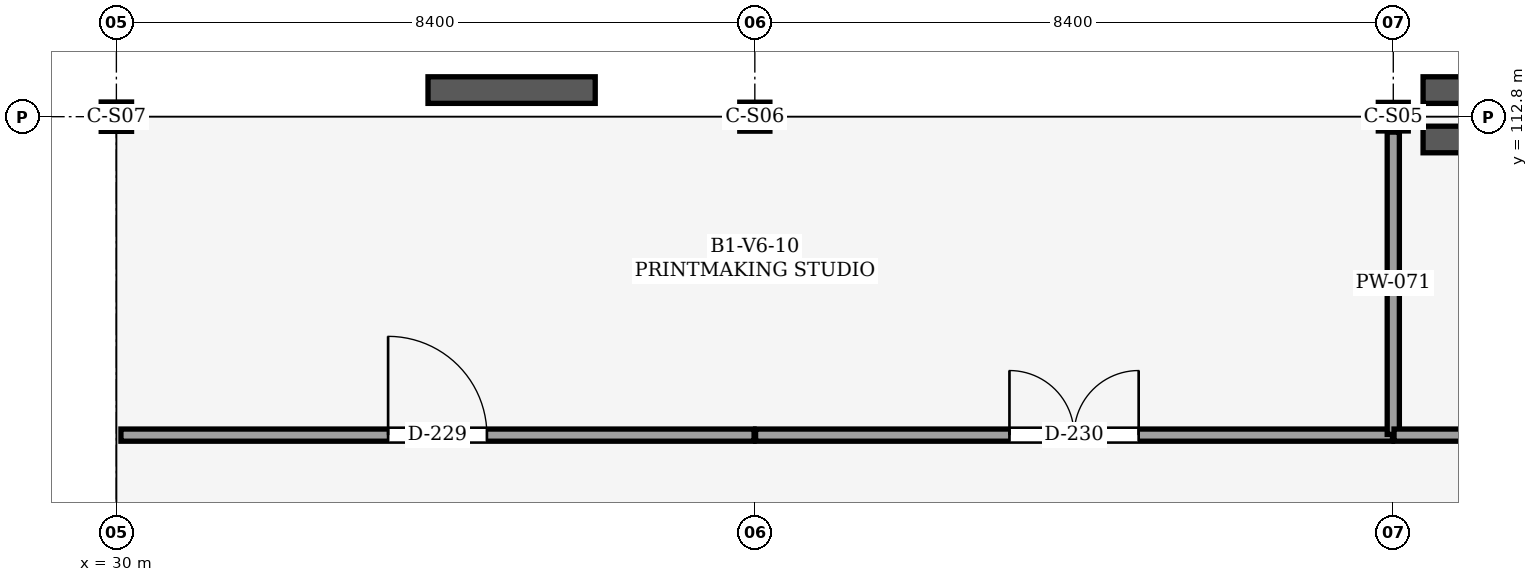
"""IFC4 building model, lengths in metres.
Left out: names, types, materials, properties, quantities, classifications, styles, units other than length and angle.
Written with IfcOpenShell. Run it as: python <this file> out.ifc"""

import sys

from ifc_helpers import new_model, si_unit, direction, frame, frame_2d, origin, origin_2d, place, context, subcontext, project, spatial, rectangle, i_section, extrude, element, fill, save


model = new_model("IFC4")
c1 = context("Model", 3, precision=1e-05, world=origin(), true_north=direction((0.0, 1.0)))
c2 = subcontext(c1, "Body", "Model", "MODEL_VIEW")
j1 = project(units=[si_unit("LENGTHUNIT", "METRE"), si_unit("PLANEANGLEUNIT", "RADIAN")], contexts=[c1])
p1 = place(None, origin())
s1 = spatial("IfcSite", under=j1, at=p1, CompositionType="ELEMENT")
p2 = place(p1, origin())
s2 = spatial("IfcBuilding", under=s1, at=p2, CompositionType="ELEMENT")
p3 = place(p2, frame((0.0, 0.0, -5.4)))
s3 = spatial("IfcBuildingStorey", under=s2, at=p3, CompositionType="ELEMENT", Elevation=-5.4)
p4 = place(p3, frame((30.0, 112.8, 0.0), z_axis=(0.0, 0.0, 1.0), x_axis=(1.0, 0.0, 0.0)))
e1 = element("IfcColumn", 1, at=p4, inside=s3, PredefinedType="COLUMN", context=c2, shape_type="SweptSolid", body=[
    extrude(i_section(OverallWidth=0.399, OverallDepth=0.386, WebThickness=0.021, FlangeThickness=0.033, FilletRadius=0.025, at=origin_2d()), origin(), (0.0, 0.0, 1.0), 5.4),
])
p5 = place(p3, frame((38.4, 112.8, 0.0), z_axis=(0.0, 0.0, 1.0), x_axis=(1.0, 0.0, 0.0)))
e2 = element("IfcColumn", 2, at=p5, inside=s3, PredefinedType="COLUMN", context=c2, shape_type="SweptSolid", body=[
    extrude(i_section(OverallWidth=0.396, OverallDepth=0.381, WebThickness=0.019, FlangeThickness=0.03, FilletRadius=0.025, at=origin_2d()), origin(), (0.0, 0.0, 1.0), 5.4),
])
p6 = place(p3, frame((46.8, 112.8, 0.0), z_axis=(0.0, 0.0, 1.0), x_axis=(1.0, 0.0, 0.0)))
e3 = element("IfcColumn", 3, at=p6, inside=s3, PredefinedType="COLUMN", context=c2, shape_type="SweptSolid", body=[
    extrude(i_section(OverallWidth=0.394, OverallDepth=0.376, WebThickness=0.017, FlangeThickness=0.028, FilletRadius=0.025, at=origin_2d()), origin(), (0.0, 0.0, 1.0), 5.4),
])
p7 = place(p3, frame((47.192, 112.5, -0.45), z_axis=(0.0, 0.0, 1.0), x_axis=(1.0, 0.0, 0.0)))
e4 = element("IfcWall", 4, at=p7, inside=s3, PredefinedType="USERDEFINED", context=c2, shape_type="SweptSolid", body=[
    extrude(rectangle(XDim=7.627, YDim=0.35, at=frame_2d((3.813, 0.0))), origin(), (0.0, 0.0, 1.0), 5.5),
])
p8 = place(p3, frame((34.1, 113.15, -0.45), z_axis=(0.0, 0.0, 1.0), x_axis=(1.0, 0.0, 0.0)))
e5 = element("IfcWall", 5, at=p8, inside=s3, PredefinedType="USERDEFINED", context=c2, shape_type="SweptSolid", body=[
    extrude(rectangle(XDim=2.2, YDim=0.35, at=frame_2d((1.1, 0.0))), origin(), (0.0, 0.0, 1.0), 5.6),
])
p9 = place(p3, frame((47.192, 113.15, -0.45), z_axis=(0.0, 0.0, 1.0), x_axis=(1.0, 0.0, 0.0)))
e6 = element("IfcWall", 6, at=p9, inside=s3, PredefinedType="USERDEFINED", context=c2, shape_type="SweptSolid", body=[
    extrude(rectangle(XDim=1.308, YDim=0.35, at=frame_2d((0.654, 0.0))), origin(), (0.0, 0.0, 1.0), 5.0),
])
p10 = place(p3, frame((30.06, 108.61, 0.0), z_axis=(0.0, 0.0, 1.0), x_axis=(1.0, 0.0, 0.0)))
e7 = element("IfcWall", 7, at=p10, inside=s3, PredefinedType="PARTITIONING", context=c2, shape_type="SweptSolid", body=[
    extrude(rectangle(XDim=8.33, YDim=0.16, at=frame_2d((4.165, 0.0))), origin(), (0.0, 0.0, 1.0), 5.1),
])
p11 = place(p10, frame((3.515, 0.0, 0.0)))
e8 = element("IfcOpeningElement", 8, at=p11, cuts=e7, PredefinedType="OPENING", context=c2, shape_type="SweptSolid", body=[
    extrude(rectangle(XDim=1.3, YDim=2.2, at=frame_2d((0.65, 1.1))), frame((0.0, 0.09, 0.0), z_axis=(0.0, -1.0, 0.0), x_axis=(1.0, 0.0, 0.0)), (0.0, 0.0, 1.0), 0.18),
])
p12 = place(p3, frame((38.41, 108.61, 0.0), z_axis=(0.0, 0.0, 1.0), x_axis=(1.0, 0.0, 0.0)))
e9 = element("IfcWall", 9, at=p12, inside=s3, PredefinedType="PARTITIONING", context=c2, shape_type="SweptSolid", body=[
    extrude(rectangle(XDim=8.38, YDim=0.16, at=frame_2d((4.19, 0.0))), origin(), (0.0, 0.0, 1.0), 5.1),
])
p13 = place(p12, frame((3.34, 0.0, 0.0)))
e10 = element("IfcOpeningElement", 10, at=p13, cuts=e9, PredefinedType="OPENING", context=c2, shape_type="SweptSolid", body=[
    extrude(rectangle(XDim=1.7, YDim=2.4, at=frame_2d((0.85, 1.2))), frame((0.0, 0.09, 0.0), z_axis=(0.0, -1.0, 0.0), x_axis=(1.0, 0.0, 0.0)), (0.0, 0.0, 1.0), 0.18),
])
p14 = place(p3, frame((46.8, 108.62, 0.0), z_axis=(0.0, 0.0, 1.0), x_axis=(0.0, 1.0, 0.0)))
e11 = element("IfcWall", 11, at=p14, inside=s3, PredefinedType="PARTITIONING", context=c2, shape_type="SweptSolid", body=[
    extrude(rectangle(XDim=3.977, YDim=0.16, at=frame_2d((1.988, 0.0))), origin(), (0.0, 0.0, 1.0), 4.493),
])
p15 = place(p3, frame((46.81, 108.61, 0.0), z_axis=(0.0, 0.0, 1.0), x_axis=(1.0, 0.0, 0.0)))
e12 = element("IfcWall", 12, at=p15, inside=s3, PredefinedType="PARTITIONING", context=c2, shape_type="SweptSolid", body=[
    extrude(rectangle(XDim=8.38, YDim=0.16, at=frame_2d((4.19, 0.0))), origin(), (0.0, 0.0, 1.0), 5.1),
])
p16 = place(p15, frame((3.59, 0.0, 0.0)))
e13 = element("IfcOpeningElement", 13, at=p16, cuts=e12, PredefinedType="OPENING", context=c2, shape_type="SweptSolid", body=[
    extrude(rectangle(XDim=1.2, YDim=2.2, at=frame_2d((0.6, 1.1))), frame((0.0, 0.09, 0.0), z_axis=(0.0, -1.0, 0.0), x_axis=(1.0, 0.0, 0.0)), (0.0, 0.0, 1.0), 0.18),
])
p17 = place(p11, origin())
e14 = element("IfcDoor", 14, at=p17, inside=s3, OperationType="SINGLE_SWING_LEFT", PredefinedType="DOOR", context=c2, shape_type="SweptSolid", body=[
    extrude(rectangle(XDim=1.3, YDim=2.2, at=frame_2d((0.65, 1.1))), frame((0.0, 0.025, 0.0), z_axis=(0.0, -1.0, 0.0), x_axis=(1.0, 0.0, 0.0)), (0.0, 0.0, 1.0), 0.05),
])
fill(e8, e14)
p18 = place(p13, origin())
e15 = element("IfcDoor", 15, at=p18, inside=s3, OperationType="DOUBLE_DOOR_SINGLE_SWING", PredefinedType="DOOR", context=c2, shape_type="SweptSolid", body=[
    extrude(rectangle(XDim=1.7, YDim=2.4, at=frame_2d((0.85, 1.2))), frame((0.0, 0.025, 0.0), z_axis=(0.0, -1.0, 0.0), x_axis=(1.0, 0.0, 0.0)), (0.0, 0.0, 1.0), 0.05),
])
fill(e10, e15)
save(model, sys.argv[1])
